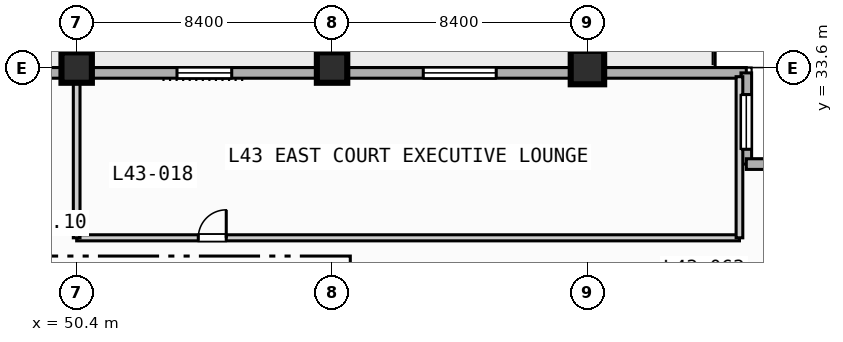
"""IFC4 building model, lengths in metres.
Left out: names, types, materials, properties, quantities, classifications, styles, units other than length and angle.
Written with IfcOpenShell. Run it as: python <this file> out.ifc"""

import sys

from ifc_helpers import new_model, si_unit, direction, frame, frame_2d, origin, origin_2d, place, context, subcontext, project, spatial, rectangle, extrude, element, fill, save


model = new_model("IFC4")
c1 = context("Model", 3, precision=1e-05, world=origin(), true_north=direction((0.0, 1.0)))
c2 = subcontext(c1, "Body", "Model", "MODEL_VIEW")
j1 = project(units=[si_unit("LENGTHUNIT", "METRE"), si_unit("PLANEANGLEUNIT", "RADIAN")], contexts=[c1])
p1 = place(None, origin())
s1 = spatial("IfcSite", under=j1, at=p1, CompositionType="ELEMENT")
p2 = place(p1, origin())
s2 = spatial("IfcBuilding", under=s1, at=p2, CompositionType="ELEMENT")
p3 = place(p2, frame((0.0, 0.0, 179.1)))
s3 = spatial("IfcBuildingStorey", under=s2, at=p3, CompositionType="ELEMENT", Elevation=179.1)
for number, where, z_axis, x_axis in (
    (1, (50.4, 33.6, 0.0), (0.0, 0.0, 1.0), (1.0, 0.0, 0.0)),
    (2, (58.8, 33.6, 0.0), (0.0, 0.0, 1.0), (1.0, 0.0, 0.0)),
):
    element("IfcColumn", number, at=place(p3, frame(where, z_axis=z_axis, x_axis=x_axis)), inside=s3, PredefinedType="COLUMN", context=c2, shape_type="SweptSolid", body=[
        extrude(rectangle(XDim=1.0, YDim=1.0, at=origin_2d()), origin(), (0.0, 0.0, 1.0), 3.7),
    ])
p4 = place(p3, frame((67.2, 33.6, 0.0), z_axis=(0.0, 0.0, 1.0), x_axis=(1.0, 0.0, 0.0)))
e3 = element("IfcColumn", 3, at=p4, inside=s3, PredefinedType="COLUMN", context=c2, shape_type="SweptSolid", body=[
    extrude(rectangle(XDim=1.1, YDim=1.1, at=origin_2d()), origin(), (0.0, 0.0, 1.0), 3.7),
])
p5 = place(p3, frame((33.425, 33.425, 0.0), z_axis=(0.0, 0.0, 1.0), x_axis=(1.0, 0.0, 0.0)))
e4 = element("IfcWall", 4, at=p5, inside=s3, PredefinedType="STANDARD", context=c2, shape_type="SweptSolid", body=[
    extrude(rectangle(XDim=39.0, YDim=0.35, at=frame_2d((19.5, 0.0))), origin(), (0.0, 0.0, 1.0), 3.47),
])
p6 = place(p5, frame((12.075, 0.0, 0.0)))
e5 = element("IfcOpeningElement", 5, at=p6, cuts=e4, PredefinedType="OPENING", context=c2, shape_type="SweptSolid", body=[
    extrude(rectangle(XDim=1.4, YDim=2.2, at=frame_2d((0.7, 1.1))), frame((0.0, 0.185, 0.0), z_axis=(0.0, -1.0, 0.0), x_axis=(1.0, 0.0, 0.0)), (0.0, 0.0, 1.0), 0.37),
])
p7 = place(p5, frame((20.275, 0.0, 0.85)))
e6 = element("IfcOpeningElement", 6, at=p7, cuts=e4, PredefinedType="OPENING", context=c2, shape_type="SweptSolid", body=[
    extrude(rectangle(XDim=1.8, YDim=1.8, at=frame_2d((0.9, 0.9))), frame((0.0, 0.185, 0.0), z_axis=(0.0, -1.0, 0.0), x_axis=(1.0, 0.0, 0.0)), (0.0, 0.0, 1.0), 0.37),
])
p8 = place(p5, frame((28.375, 0.0, 0.85)))
e7 = element("IfcOpeningElement", 7, at=p8, cuts=e4, PredefinedType="OPENING", context=c2, shape_type="SweptSolid", body=[
    extrude(rectangle(XDim=2.4, YDim=1.95, at=frame_2d((1.2, 0.975))), frame((0.0, 0.185, 0.0), z_axis=(0.0, -1.0, 0.0), x_axis=(1.0, 0.0, 0.0)), (0.0, 0.0, 1.0), 0.37),
])
p9 = place(p3, frame((72.425, 33.425, 0.0), z_axis=(0.0, 0.0, 1.0), x_axis=(0.0, -1.0, 0.0)))
e8 = element("IfcWall", 8, at=p9, inside=s3, PredefinedType="STANDARD", context=c2, shape_type="SweptSolid", body=[
    extrude(rectangle(XDim=3.0, YDim=0.35, at=frame_2d((1.5, 0.0))), origin(), (0.0, 0.0, 1.0), 3.47),
])
p10 = place(p9, frame((0.712, 0.0, 0.85)))
e9 = element("IfcOpeningElement", 9, at=p10, cuts=e8, PredefinedType="OPENING", context=c2, shape_type="SweptSolid", body=[
    extrude(rectangle(XDim=1.8, YDim=1.8, at=frame_2d((0.9, 0.9))), frame((0.0, 0.185, 0.0), z_axis=(0.0, -1.0, 0.0), x_axis=(1.0, 0.0, 0.0)), (0.0, 0.0, 1.0), 0.37),
])
p11 = place(p3, frame((72.425, 30.425, 0.0), z_axis=(0.0, 0.0, 1.0), x_axis=(1.0, 0.0, 0.0)))
e10 = element("IfcWall", 10, at=p11, inside=s3, PredefinedType="STANDARD", context=c2, shape_type="SweptSolid", body=[
    extrude(rectangle(XDim=3.0, YDim=0.35, at=frame_2d((1.5, 0.0))), origin(), (0.0, 0.0, 1.0), 3.47),
])
p12 = place(p3, frame((50.4, 28.0, 0.0), z_axis=(0.0, 0.0, 1.0), x_axis=(1.0, 0.0, 0.0)))
e11 = element("IfcWall", 11, at=p12, inside=s3, PredefinedType="PARTITIONING", context=c2, shape_type="SweptSolid", body=[
    extrude(rectangle(XDim=21.8, YDim=0.2, at=frame_2d((10.9, 0.0))), origin(), (0.0, 0.0, 1.0), 3.47),
])
p13 = place(p12, frame((4.0, 0.0, 0.0)))
e12 = element("IfcOpeningElement", 12, at=p13, cuts=e11, PredefinedType="OPENING", context=c2, shape_type="SweptSolid", body=[
    extrude(rectangle(XDim=0.92, YDim=2.1, at=frame_2d((0.46, 1.05))), frame((0.0, 0.11, 0.0), z_axis=(0.0, -1.0, 0.0), x_axis=(1.0, 0.0, 0.0)), (0.0, 0.0, 1.0), 0.22),
])
p14 = place(p3, frame((50.4, 28.0, 0.0), z_axis=(0.0, 0.0, 1.0), x_axis=(0.0, 1.0, 0.0)))
e13 = element("IfcWall", 13, at=p14, inside=s3, PredefinedType="PARTITIONING", context=c2, shape_type="SweptSolid", body=[
    extrude(rectangle(XDim=5.3, YDim=0.22, at=frame_2d((2.65, 0.0))), origin(), (0.0, 0.0, 1.0), 3.053),
])
p15 = place(p3, frame((72.2, 28.0, 0.0), z_axis=(0.0, 0.0, 1.0), x_axis=(0.0, 1.0, 0.0)))
e14 = element("IfcWall", 14, at=p15, inside=s3, PredefinedType="PARTITIONING", context=c2, shape_type="SweptSolid", body=[
    extrude(rectangle(XDim=5.3, YDim=0.22, at=frame_2d((2.65, 0.0))), origin(), (0.0, 0.0, 1.0), 3.47),
])
p16 = place(p7, origin())
e15 = element("IfcWindow", 15, at=p16, inside=s3, PartitioningType="SINGLE_PANEL", PredefinedType="WINDOW", context=c2, shape_type="SweptSolid", body=[
    extrude(rectangle(XDim=1.8, YDim=1.8, at=frame_2d((0.9, 0.9))), frame((0.0, 0.03, 0.0), z_axis=(0.0, -1.0, 0.0), x_axis=(1.0, 0.0, 0.0)), (0.0, 0.0, 1.0), 0.06),
])
fill(e6, e15)
p17 = place(p8, origin())
e16 = element("IfcWindow", 16, at=p17, inside=s3, PartitioningType="SINGLE_PANEL", PredefinedType="WINDOW", context=c2, shape_type="SweptSolid", body=[
    extrude(rectangle(XDim=2.4, YDim=1.95, at=frame_2d((1.2, 0.975))), frame((0.0, 0.03, 0.0), z_axis=(0.0, -1.0, 0.0), x_axis=(1.0, 0.0, 0.0)), (0.0, 0.0, 1.0), 0.06),
])
fill(e7, e16)
p18 = place(p10, origin())
e17 = element("IfcWindow", 17, at=p18, inside=s3, PartitioningType="SINGLE_PANEL", PredefinedType="WINDOW", context=c2, shape_type="SweptSolid", body=[
    extrude(rectangle(XDim=1.8, YDim=1.8, at=frame_2d((0.9, 0.9))), frame((0.0, 0.03, 0.0), z_axis=(0.0, -1.0, 0.0), x_axis=(1.0, 0.0, 0.0)), (0.0, 0.0, 1.0), 0.06),
])
fill(e9, e17)
p19 = place(p13, origin())
e18 = element("IfcDoor", 18, at=p19, inside=s3, OperationType="SINGLE_SWING_RIGHT", PredefinedType="DOOR", context=c2, shape_type="SweptSolid", body=[
    extrude(rectangle(XDim=0.92, YDim=2.1, at=frame_2d((0.46, 1.05))), frame((0.0, 0.025, 0.0), z_axis=(0.0, -1.0, 0.0), x_axis=(1.0, 0.0, 0.0)), (0.0, 0.0, 1.0), 0.05),
])
fill(e12, e18)
save(model, sys.argv[1])
